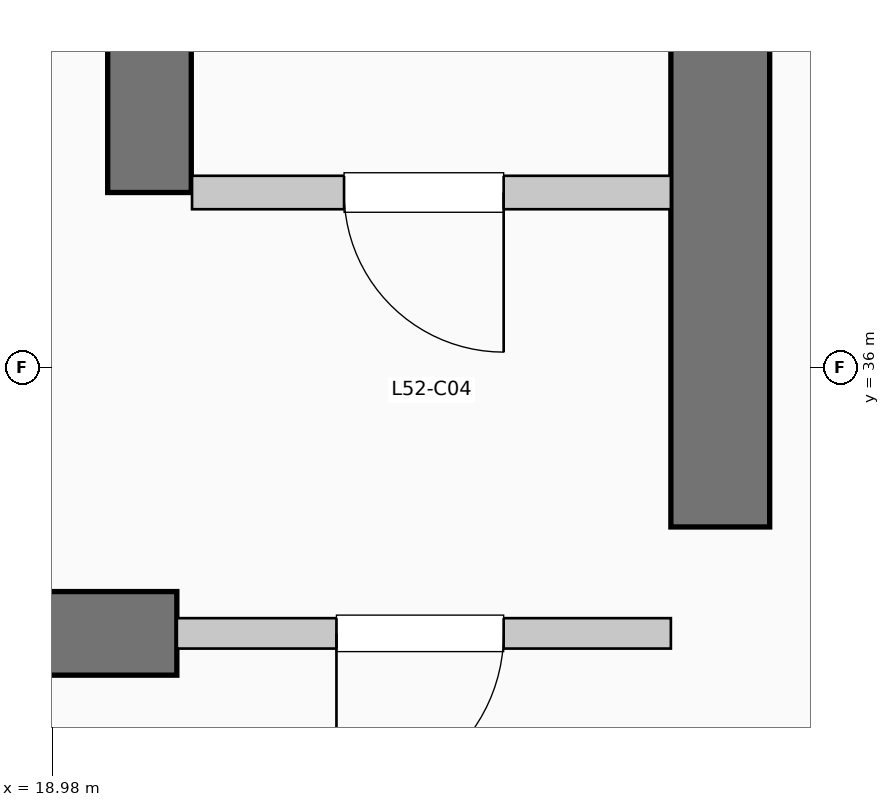
"""IFC4 building model, lengths in metres.
Left out: names, types, materials, properties, quantities, classifications, styles, units other than length and angle.
Written with IfcOpenShell. Run it as: python <this file> out.ifc"""

import sys

from ifc_helpers import new_model, si_unit, direction, frame, frame_2d, origin, place, context, subcontext, project, spatial, rectangle, extrude, element, fill, save


model = new_model("IFC4")
c1 = context("Model", 3, precision=1e-05, world=origin(), true_north=direction((0.0, 1.0)))
c2 = subcontext(c1, "Body", "Model", "MODEL_VIEW")
j1 = project(units=[si_unit("LENGTHUNIT", "METRE"), si_unit("PLANEANGLEUNIT", "RADIAN")], contexts=[c1])
p1 = place(None, origin())
s1 = spatial("IfcSite", under=j1, at=p1, CompositionType="ELEMENT")
p2 = place(p1, origin())
s2 = spatial("IfcBuilding", under=s1, at=p2, CompositionType="ELEMENT")
p3 = place(p2, frame((0.0, 0.0, 215.16)))
s3 = spatial("IfcBuildingStorey", under=s2, at=p3, CompositionType="ELEMENT", Elevation=215.16)
p4 = place(p3, frame((23.375, 34.95, 0.0), z_axis=(0.0, 0.0, 1.0), x_axis=(0.0, 1.0, 0.0)))
e1 = element("IfcWall", 1, at=p4, inside=s3, PredefinedType="SHEAR", context=c2, shape_type="SweptSolid", body=[
    extrude(rectangle(XDim=10.64, YDim=0.65, at=frame_2d((5.32, 0.0))), origin(), (0.0, 0.0, 1.0), 4.62),
])
p5 = place(p3, frame((13.68, 34.25, 0.0), z_axis=(0.0, 0.0, 1.0), x_axis=(1.0, 0.0, 0.0)))
e2 = element("IfcWall", 2, at=p5, inside=s3, PredefinedType="SHEAR", context=c2, shape_type="SweptSolid", body=[
    extrude(rectangle(XDim=6.12, YDim=0.55, at=frame_2d((3.06, 0.0))), origin(), (0.0, 0.0, 1.0), 4.62),
])
p6 = place(p3, frame((19.62, 37.15, 0.0), z_axis=(0.0, 0.0, 1.0), x_axis=(0.0, 1.0, 0.0)))
e3 = element("IfcWall", 3, at=p6, inside=s3, PredefinedType="SHEAR", context=c2, shape_type="SweptSolid", body=[
    extrude(rectangle(XDim=7.89, YDim=0.55, at=frame_2d((3.945, 0.0))), origin(), (0.0, 0.0, 1.0), 4.62),
])
p7 = place(p3, frame((19.9, 37.15, 0.0), z_axis=(0.0, 0.0, 1.0), x_axis=(1.0, 0.0, 0.0)))
e4 = element("IfcWall", 4, at=p7, inside=s3, PredefinedType="PARTITIONING", context=c2, shape_type="SweptSolid", body=[
    extrude(rectangle(XDim=3.15, YDim=0.22, at=frame_2d((1.575, 0.0))), origin(), (0.0, 0.0, 1.0), 4.37),
])
p8 = place(p7, frame((2.05, 0.0, 0.0), z_axis=(0.0, 0.0, 1.0), x_axis=(-1.0, 0.0, 0.0)))
e5 = element("IfcOpeningElement", 5, at=p8, cuts=e4, PredefinedType="OPENING", context=c2, shape_type="SweptSolid", body=[
    extrude(rectangle(XDim=1.05, YDim=2.15, at=frame_2d((0.525, 1.075))), frame((0.0, 0.12, 0.0), z_axis=(0.0, -1.0, 0.0), x_axis=(1.0, 0.0, 0.0)), (0.0, 0.0, 1.0), 0.24),
])
p9 = place(p3, frame((19.8, 34.25, 0.0), z_axis=(0.0, 0.0, 1.0), x_axis=(1.0, 0.0, 0.0)))
e6 = element("IfcWall", 6, at=p9, inside=s3, PredefinedType="PARTITIONING", context=c2, shape_type="SweptSolid", body=[
    extrude(rectangle(XDim=3.25, YDim=0.2, at=frame_2d((1.625, 0.0))), origin(), (0.0, 0.0, 1.0), 4.37),
])
p10 = place(p9, frame((2.15, 0.0, 0.0), z_axis=(0.0, 0.0, 1.0), x_axis=(-1.0, 0.0, 0.0)))
e7 = element("IfcOpeningElement", 7, at=p10, cuts=e6, PredefinedType="OPENING", context=c2, shape_type="SweptSolid", body=[
    extrude(rectangle(XDim=1.1, YDim=2.15, at=frame_2d((0.55, 1.075))), frame((0.0, 0.11, 0.0), z_axis=(0.0, -1.0, 0.0), x_axis=(1.0, 0.0, 0.0)), (0.0, 0.0, 1.0), 0.22),
])
p11 = place(p8, origin())
e8 = element("IfcDoor", 8, at=p11, inside=s3, OperationType="SINGLE_SWING_RIGHT", PredefinedType="DOOR", context=c2, shape_type="SweptSolid", body=[
    extrude(rectangle(XDim=1.05, YDim=2.15, at=frame_2d((0.525, 1.075))), frame((0.0, 0.025, 0.0), z_axis=(0.0, -1.0, 0.0), x_axis=(1.0, 0.0, 0.0)), (0.0, 0.0, 1.0), 0.05),
])
fill(e5, e8)
p12 = place(p10, origin())
e9 = element("IfcDoor", 9, at=p12, inside=s3, OperationType="SINGLE_SWING_LEFT", PredefinedType="DOOR", context=c2, shape_type="SweptSolid", body=[
    extrude(rectangle(XDim=1.1, YDim=2.15, at=frame_2d((0.55, 1.075))), frame((0.0, 0.025, 0.0), z_axis=(0.0, -1.0, 0.0), x_axis=(1.0, 0.0, 0.0)), (0.0, 0.0, 1.0), 0.05),
])
fill(e7, e9)
save(model, sys.argv[1])
